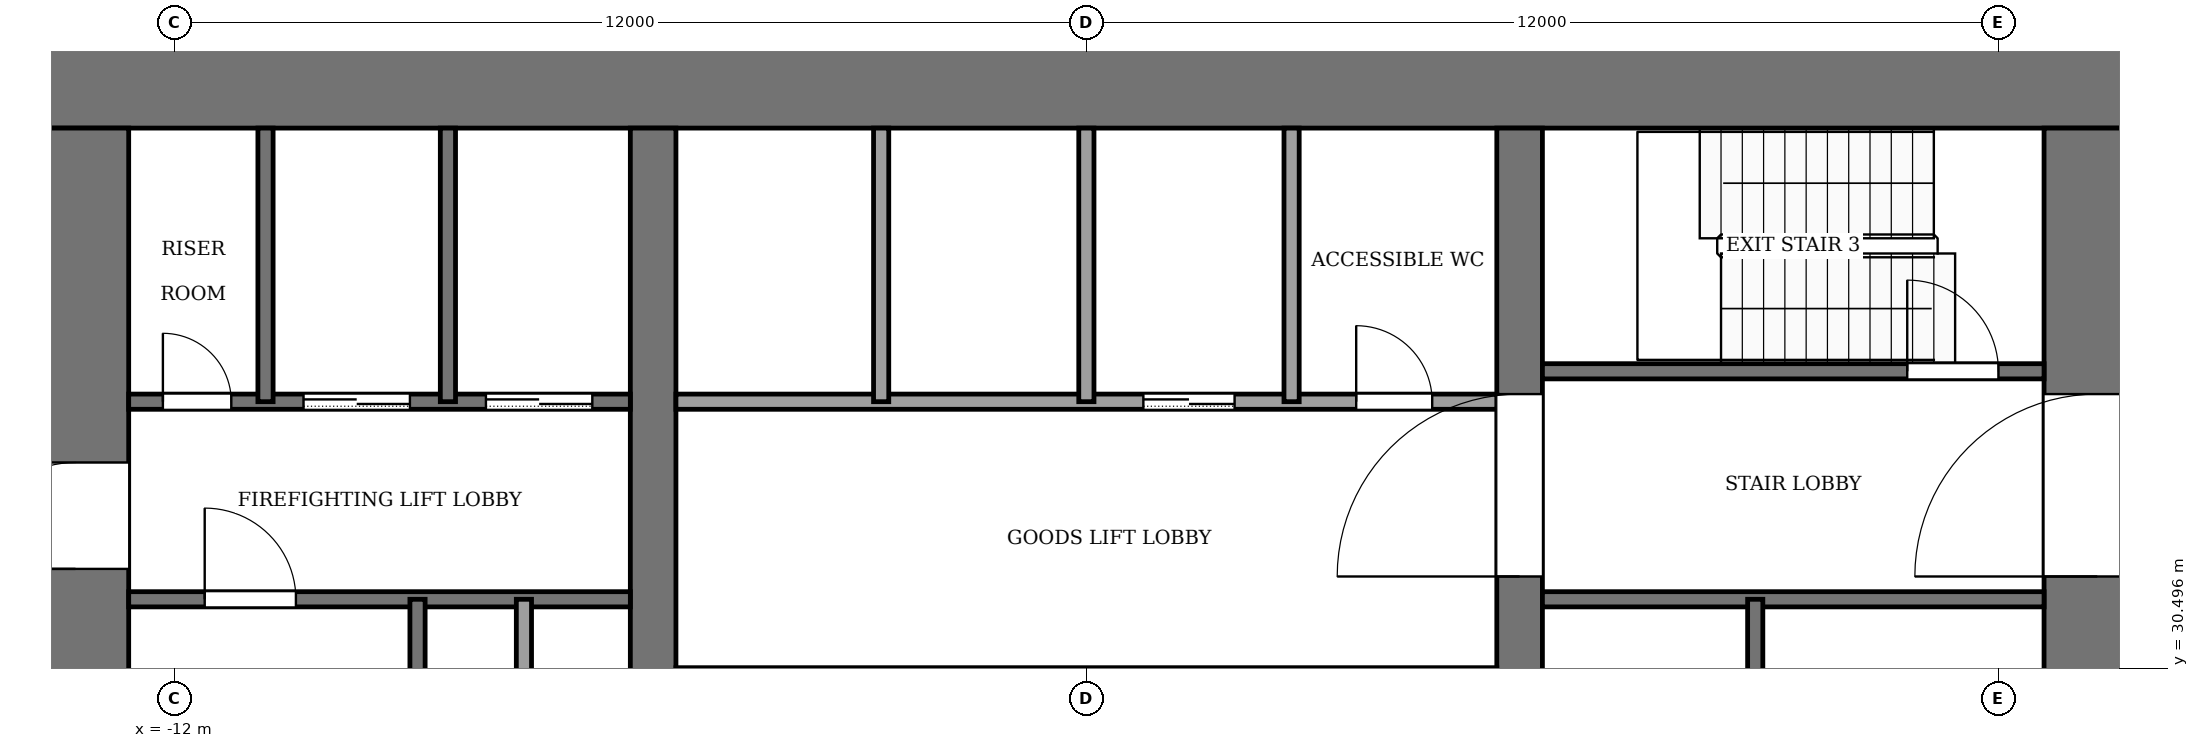
"""IFC4 building model, lengths in metres.
Left out: names, types, materials, properties, quantities, classifications, styles, units other than length and angle.
Written with IfcOpenShell. Run it as: python <this file> out.ifc"""

import sys

from ifc_helpers import new_model, si_unit, direction, frame, frame_2d, origin, place, context, subcontext, project, spatial, rectangle, extrude, element, fill, save


model = new_model("IFC4")
c1 = context("Model", 3, precision=1e-05, world=origin(), true_north=direction((0.0, 1.0)))
c2 = subcontext(c1, "Body", "Model", "MODEL_VIEW")
j1 = project(units=[si_unit("LENGTHUNIT", "METRE"), si_unit("PLANEANGLEUNIT", "RADIAN")], contexts=[c1])
p1 = place(None, origin())
s1 = spatial("IfcSite", under=j1, at=p1, CompositionType="ELEMENT")
p2 = place(p1, origin())
s2 = spatial("IfcBuilding", under=s1, at=p2, CompositionType="ELEMENT")
p3 = place(p2, frame((0.0, 0.0, 22.0)))
s3 = spatial("IfcBuildingStorey", under=s2, at=p3, CompositionType="ELEMENT", Elevation=22.0)
p4 = place(p3, frame((-14.0, 38.3, -0.13), z_axis=(0.0, 0.0, 1.0), x_axis=(1.0, 0.0, 0.0)))
e1 = element("IfcWall", 1, at=p4, inside=s3, PredefinedType="SHEAR", context=c2, shape_type="SweptSolid", body=[
    extrude(rectangle(XDim=28.0, YDim=1.4, at=frame_2d((14.0, 0.0))), origin(), (0.0, 0.0, 1.0), 4.0),
])
p5 = place(p3, frame((-13.3, 18.4, -0.13), z_axis=(0.0, 0.0, 1.0), x_axis=(0.0, 1.0, 0.0)))
e2 = element("IfcWall", 2, at=p5, inside=s3, PredefinedType="SHEAR", context=c2, shape_type="SweptSolid", body=[
    extrude(rectangle(XDim=19.2, YDim=1.4, at=frame_2d((9.6, 0.0))), origin(), (0.0, 0.0, 1.0), 4.0),
])
p6 = place(p5, frame((2.8, 0.0, 0.13)))
e3 = element("IfcOpeningElement", 3, at=p6, cuts=e2, PredefinedType="OPENING", context=c2, shape_type="SweptSolid", body=[
    extrude(rectangle(XDim=2.4, YDim=2.4, at=frame_2d((1.2, 1.2))), frame((0.0, 0.71, 0.0), z_axis=(0.0, -1.0, 0.0), x_axis=(1.0, 0.0, 0.0)), (0.0, 0.0, 1.0), 1.42),
])
p7 = place(p5, frame((13.4, 0.0, 0.13)))
e4 = element("IfcOpeningElement", 4, at=p7, cuts=e2, PredefinedType="OPENING", context=c2, shape_type="SweptSolid", body=[
    extrude(rectangle(XDim=1.4, YDim=2.2, at=frame_2d((0.7, 1.1))), frame((0.0, 0.71, 0.0), z_axis=(0.0, -1.0, 0.0), x_axis=(1.0, 0.0, 0.0)), (0.0, 0.0, 1.0), 1.42),
])
p8 = place(p3, frame((13.3, 18.4, -0.13), z_axis=(0.0, 0.0, 1.0), x_axis=(0.0, 1.0, 0.0)))
e5 = element("IfcWall", 5, at=p8, inside=s3, PredefinedType="SHEAR", context=c2, shape_type="SweptSolid", body=[
    extrude(rectangle(XDim=19.2, YDim=1.4, at=frame_2d((9.6, 0.0))), origin(), (0.0, 0.0, 1.0), 4.0),
])
p9 = place(p8, frame((2.8, 0.0, 0.13)))
e6 = element("IfcOpeningElement", 6, at=p9, cuts=e5, PredefinedType="OPENING", context=c2, shape_type="SweptSolid", body=[
    extrude(rectangle(XDim=2.4, YDim=2.4, at=frame_2d((1.2, 1.2))), frame((0.0, 0.71, 0.0), z_axis=(0.0, -1.0, 0.0), x_axis=(1.0, 0.0, 0.0)), (0.0, 0.0, 1.0), 1.42),
])
p10 = place(p8, frame((13.3, 0.0, 0.13)))
e7 = element("IfcOpeningElement", 7, at=p10, cuts=e5, PredefinedType="OPENING", context=c2, shape_type="SweptSolid", body=[
    extrude(rectangle(XDim=2.4, YDim=2.4, at=frame_2d((1.2, 1.2))), frame((0.0, 0.71, 0.0), z_axis=(0.0, -1.0, 0.0), x_axis=(1.0, 0.0, 0.0)), (0.0, 0.0, 1.0), 1.42),
])
p11 = place(p3, frame((-5.7, 18.4, -0.13), z_axis=(0.0, 0.0, 1.0), x_axis=(0.0, 1.0, 0.0)))
e8 = element("IfcWall", 8, at=p11, inside=s3, PredefinedType="SHEAR", context=c2, shape_type="SweptSolid", body=[
    extrude(rectangle(XDim=19.2, YDim=0.6, at=frame_2d((9.6, 0.0))), origin(), (0.0, 0.0, 1.0), 4.0),
])
p12 = place(p11, frame((8.35, 0.0, 0.13)))
e9 = element("IfcOpeningElement", 9, at=p12, cuts=e8, PredefinedType="OPENING", context=c2, shape_type="SweptSolid", body=[
    extrude(rectangle(XDim=0.9, YDim=2.1, at=frame_2d((0.45, 1.05))), frame((0.0, 0.31, 0.0), z_axis=(0.0, -1.0, 0.0), x_axis=(1.0, 0.0, 0.0)), (0.0, 0.0, 1.0), 0.62),
])
p13 = place(p3, frame((5.7, 18.4, -0.13), z_axis=(0.0, 0.0, 1.0), x_axis=(0.0, 1.0, 0.0)))
e10 = element("IfcWall", 10, at=p13, inside=s3, PredefinedType="SHEAR", context=c2, shape_type="SweptSolid", body=[
    extrude(rectangle(XDim=19.2, YDim=0.6, at=frame_2d((9.6, 0.0))), origin(), (0.0, 0.0, 1.0), 4.0),
])
p14 = place(p13, frame((8.35, 0.0, 0.13)))
e11 = element("IfcOpeningElement", 11, at=p14, cuts=e10, PredefinedType="OPENING", context=c2, shape_type="SweptSolid", body=[
    extrude(rectangle(XDim=0.9, YDim=2.1, at=frame_2d((0.45, 1.05))), frame((0.0, 0.31, 0.0), z_axis=(0.0, -1.0, 0.0), x_axis=(1.0, 0.0, 0.0)), (0.0, 0.0, 1.0), 0.62),
])
p15 = place(p13, frame((13.3, 0.0, 0.13)))
e12 = element("IfcOpeningElement", 12, at=p15, cuts=e10, PredefinedType="OPENING", context=c2, shape_type="SweptSolid", body=[
    extrude(rectangle(XDim=2.4, YDim=2.4, at=frame_2d((1.2, 1.2))), frame((0.0, 0.31, 0.0), z_axis=(0.0, -1.0, 0.0), x_axis=(1.0, 0.0, 0.0)), (0.0, 0.0, 1.0), 0.62),
])
p16 = place(p3, frame((-12.6, 31.4, 0.0), z_axis=(0.0, 0.0, 1.0), x_axis=(1.0, 0.0, 0.0)))
e13 = element("IfcWall", 13, at=p16, inside=s3, PredefinedType="PARTITIONING", context=c2, shape_type="SweptSolid", body=[
    extrude(rectangle(XDim=6.6, YDim=0.2, at=frame_2d((3.3, 0.0))), origin(), (0.0, 0.0, 1.0), 3.87),
])
p17 = place(p16, frame((1.0, 0.0, 0.0)))
e14 = element("IfcOpeningElement", 14, at=p17, cuts=e13, PredefinedType="OPENING", context=c2, shape_type="SweptSolid", body=[
    extrude(rectangle(XDim=1.2, YDim=2.2, at=frame_2d((0.6, 1.1))), frame((0.0, 0.11, 0.0), z_axis=(0.0, -1.0, 0.0), x_axis=(1.0, 0.0, 0.0)), (0.0, 0.0, 1.0), 0.22),
])
p18 = place(p3, frame((6.0, 31.4, 0.0), z_axis=(0.0, 0.0, 1.0), x_axis=(1.0, 0.0, 0.0)))
e15 = element("IfcWall", 15, at=p18, inside=s3, PredefinedType="PARTITIONING", context=c2, shape_type="SweptSolid", body=[
    extrude(rectangle(XDim=6.6, YDim=0.2, at=frame_2d((3.3, 0.0))), origin(), (0.0, 0.0, 1.0), 3.87),
])
p19 = place(p3, frame((-12.6, 34.0, 0.0), z_axis=(0.0, 0.0, 1.0), x_axis=(1.0, 0.0, 0.0)))
e16 = element("IfcWall", 16, at=p19, inside=s3, PredefinedType="PARTITIONING", context=c2, shape_type="SweptSolid", body=[
    extrude(rectangle(XDim=6.6, YDim=0.2, at=frame_2d((3.3, 0.0))), origin(), (0.0, 0.0, 1.0), 3.87),
])
p20 = place(p19, frame((4.7, 0.0, 0.0)))
e17 = element("IfcOpeningElement", 17, at=p20, cuts=e16, PredefinedType="OPENING", context=c2, shape_type="SweptSolid", body=[
    extrude(rectangle(XDim=1.4, YDim=2.2, at=frame_2d((0.7, 1.1))), frame((0.0, 0.11, 0.0), z_axis=(0.0, -1.0, 0.0), x_axis=(1.0, 0.0, 0.0)), (0.0, 0.0, 1.0), 0.22),
])
p21 = place(p19, frame((2.3, 0.0, 0.0)))
e18 = element("IfcOpeningElement", 18, at=p21, cuts=e16, PredefinedType="OPENING", context=c2, shape_type="SweptSolid", body=[
    extrude(rectangle(XDim=1.4, YDim=2.2, at=frame_2d((0.7, 1.1))), frame((0.0, 0.11, 0.0), z_axis=(0.0, -1.0, 0.0), x_axis=(1.0, 0.0, 0.0)), (0.0, 0.0, 1.0), 0.22),
])
p22 = place(p19, frame((0.45, 0.0, 0.0)))
e19 = element("IfcOpeningElement", 19, at=p22, cuts=e16, PredefinedType="OPENING", context=c2, shape_type="SweptSolid", body=[
    extrude(rectangle(XDim=0.9, YDim=2.1, at=frame_2d((0.45, 1.05))), frame((0.0, 0.11, 0.0), z_axis=(0.0, -1.0, 0.0), x_axis=(1.0, 0.0, 0.0)), (0.0, 0.0, 1.0), 0.22),
])
p23 = place(p3, frame((-5.4, 34.0, 0.0), z_axis=(0.0, 0.0, 1.0), x_axis=(1.0, 0.0, 0.0)))
e20 = element("IfcWall", 20, at=p23, inside=s3, PredefinedType="PARTITIONING", context=c2, shape_type="SweptSolid", body=[
    extrude(rectangle(XDim=10.8, YDim=0.2, at=frame_2d((5.4, 0.0))), origin(), (0.0, 0.0, 1.0), 3.87),
])
p24 = place(p23, frame((6.15, 0.0, 0.0)))
e21 = element("IfcOpeningElement", 21, at=p24, cuts=e20, PredefinedType="OPENING", context=c2, shape_type="SweptSolid", body=[
    extrude(rectangle(XDim=1.2, YDim=2.2, at=frame_2d((0.6, 1.1))), frame((0.0, 0.11, 0.0), z_axis=(0.0, -1.0, 0.0), x_axis=(1.0, 0.0, 0.0)), (0.0, 0.0, 1.0), 0.22),
])
p25 = place(p23, frame((8.95, 0.0, 0.0)))
e22 = element("IfcOpeningElement", 22, at=p25, cuts=e20, PredefinedType="OPENING", context=c2, shape_type="SweptSolid", body=[
    extrude(rectangle(XDim=1.0, YDim=2.1, at=frame_2d((0.5, 1.05))), frame((0.0, 0.11, 0.0), z_axis=(0.0, -1.0, 0.0), x_axis=(1.0, 0.0, 0.0)), (0.0, 0.0, 1.0), 0.22),
])
p26 = place(p3, frame((6.0, 34.4, 0.0), z_axis=(0.0, 0.0, 1.0), x_axis=(1.0, 0.0, 0.0)))
e23 = element("IfcWall", 23, at=p26, inside=s3, PredefinedType="PARTITIONING", context=c2, shape_type="SweptSolid", body=[
    extrude(rectangle(XDim=6.6, YDim=0.2, at=frame_2d((3.3, 0.0))), origin(), (0.0, 0.0, 1.0), 3.87),
])
p27 = place(p26, frame((4.8, 0.0, 0.0)))
e24 = element("IfcOpeningElement", 24, at=p27, cuts=e23, PredefinedType="OPENING", context=c2, shape_type="SweptSolid", body=[
    extrude(rectangle(XDim=1.2, YDim=2.2, at=frame_2d((0.6, 1.1))), frame((0.0, 0.11, 0.0), z_axis=(0.0, -1.0, 0.0), x_axis=(1.0, 0.0, 0.0)), (0.0, 0.0, 1.0), 0.22),
])
p28 = place(p3, frame((-10.8, 34.0, 0.0), z_axis=(0.0, 0.0, 1.0), x_axis=(0.0, 1.0, 0.0)))
e25 = element("IfcWall", 25, at=p28, inside=s3, PredefinedType="PARTITIONING", context=c2, shape_type="SweptSolid", body=[
    extrude(rectangle(XDim=3.6, YDim=0.2, at=frame_2d((1.8, 0.0))), origin(), (0.0, 0.0, 1.0), 3.87),
])
p29 = place(p3, frame((-8.8, 24.0, 0.0), z_axis=(0.0, 0.0, 1.0), x_axis=(0.0, 1.0, 0.0)))
e26 = element("IfcWall", 26, at=p29, inside=s3, PredefinedType="PARTITIONING", context=c2, shape_type="SweptSolid", body=[
    extrude(rectangle(XDim=7.4, YDim=0.2, at=frame_2d((3.7, 0.0))), origin(), (0.0, 0.0, 1.0), 3.87),
])
p30 = place(p3, frame((-8.4, 34.0, 0.0), z_axis=(0.0, 0.0, 1.0), x_axis=(0.0, 1.0, 0.0)))
e27 = element("IfcWall", 27, at=p30, inside=s3, PredefinedType="PARTITIONING", context=c2, shape_type="SweptSolid", body=[
    extrude(rectangle(XDim=3.6, YDim=0.2, at=frame_2d((1.8, 0.0))), origin(), (0.0, 0.0, 1.0), 3.87),
])
p31 = place(p3, frame((-7.4, 24.0, 0.0), z_axis=(0.0, 0.0, 1.0), x_axis=(0.0, 1.0, 0.0)))
e28 = element("IfcWall", 28, at=p31, inside=s3, PredefinedType="PARTITIONING", context=c2, shape_type="SweptSolid", body=[
    extrude(rectangle(XDim=7.4, YDim=0.2, at=frame_2d((3.7, 0.0))), origin(), (0.0, 0.0, 1.0), 3.87),
])
for number, where, z_axis, x_axis in (
    (29, (-2.7, 34.0, 0.0), (0.0, 0.0, 1.0), (0.0, 1.0, 0.0)),
    (30, (0.0, 34.0, 0.0), (0.0, 0.0, 1.0), (0.0, 1.0, 0.0)),
    (31, (2.7, 34.0, 0.0), (0.0, 0.0, 1.0), (0.0, 1.0, 0.0)),
):
    element("IfcWall", number, at=place(p3, frame(where, z_axis=z_axis, x_axis=x_axis)), inside=s3, PredefinedType="PARTITIONING", context=c2, shape_type="SweptSolid", body=[
        extrude(rectangle(XDim=3.6, YDim=0.2, at=frame_2d((1.8, 0.0))), origin(), (0.0, 0.0, 1.0), 3.87),
    ])
p32 = place(p3, frame((8.8, 24.0, 0.0), z_axis=(0.0, 0.0, 1.0), x_axis=(0.0, 1.0, 0.0)))
e32 = element("IfcWall", 32, at=p32, inside=s3, PredefinedType="PARTITIONING", context=c2, shape_type="SweptSolid", body=[
    extrude(rectangle(XDim=7.4, YDim=0.2, at=frame_2d((3.7, 0.0))), origin(), (0.0, 0.0, 1.0), 3.87),
])
p33 = place(p24, origin())
e33 = element("IfcDoor", 33, at=p33, inside=s3, OperationType="SLIDING_TO_LEFT", PredefinedType="DOOR", context=c2, shape_type="SweptSolid", body=[
    extrude(rectangle(XDim=1.2, YDim=2.2, at=frame_2d((0.6, 1.1))), frame((0.0, 0.025, 0.0), z_axis=(0.0, -1.0, 0.0), x_axis=(1.0, 0.0, 0.0)), (0.0, 0.0, 1.0), 0.05),
])
fill(e21, e33)
p34 = place(p20, origin())
e34 = element("IfcDoor", 34, at=p34, inside=s3, OperationType="SLIDING_TO_LEFT", PredefinedType="DOOR", context=c2, shape_type="SweptSolid", body=[
    extrude(rectangle(XDim=1.4, YDim=2.2, at=frame_2d((0.7, 1.1))), frame((0.0, 0.025, 0.0), z_axis=(0.0, -1.0, 0.0), x_axis=(1.0, 0.0, 0.0)), (0.0, 0.0, 1.0), 0.05),
])
fill(e17, e34)
p35 = place(p21, origin())
e35 = element("IfcDoor", 35, at=p35, inside=s3, OperationType="SLIDING_TO_LEFT", PredefinedType="DOOR", context=c2, shape_type="SweptSolid", body=[
    extrude(rectangle(XDim=1.4, YDim=2.2, at=frame_2d((0.7, 1.1))), frame((0.0, 0.025, 0.0), z_axis=(0.0, -1.0, 0.0), x_axis=(1.0, 0.0, 0.0)), (0.0, 0.0, 1.0), 0.05),
])
fill(e18, e35)
p36 = place(p22, origin())
e36 = element("IfcDoor", 36, at=p36, inside=s3, OperationType="SINGLE_SWING_RIGHT", PredefinedType="DOOR", context=c2, shape_type="SweptSolid", body=[
    extrude(rectangle(XDim=0.9, YDim=2.1, at=frame_2d((0.45, 1.05))), frame((0.0, 0.025, 0.0), z_axis=(0.0, -1.0, 0.0), x_axis=(1.0, 0.0, 0.0)), (0.0, 0.0, 1.0), 0.05),
])
fill(e19, e36)
p37 = place(p25, origin())
e37 = element("IfcDoor", 37, at=p37, inside=s3, OperationType="SINGLE_SWING_LEFT", PredefinedType="DOOR", context=c2, shape_type="SweptSolid", body=[
    extrude(rectangle(XDim=1.0, YDim=2.1, at=frame_2d((0.5, 1.05))), frame((0.0, 0.025, 0.0), z_axis=(0.0, -1.0, 0.0), x_axis=(1.0, 0.0, 0.0)), (0.0, 0.0, 1.0), 0.05),
])
fill(e22, e37)
p38 = place(p17, origin())
e38 = element("IfcDoor", 38, at=p38, inside=s3, OperationType="SINGLE_SWING_RIGHT", PredefinedType="DOOR", context=c2, shape_type="SweptSolid", body=[
    extrude(rectangle(XDim=1.2, YDim=2.2, at=frame_2d((0.6, 1.1))), frame((0.0, 0.025, 0.0), z_axis=(0.0, -1.0, 0.0), x_axis=(1.0, 0.0, 0.0)), (0.0, 0.0, 1.0), 0.05),
])
fill(e14, e38)
p39 = place(p27, origin())
e39 = element("IfcDoor", 39, at=p39, inside=s3, OperationType="SINGLE_SWING_RIGHT", PredefinedType="DOOR", context=c2, shape_type="SweptSolid", body=[
    extrude(rectangle(XDim=1.2, YDim=2.2, at=frame_2d((0.6, 1.1))), frame((0.0, 0.025, 0.0), z_axis=(0.0, -1.0, 0.0), x_axis=(1.0, 0.0, 0.0)), (0.0, 0.0, 1.0), 0.05),
])
fill(e24, e39)
p40 = place(p15, origin())
e40 = element("IfcDoor", 40, at=p40, inside=s3, OperationType="DOUBLE_DOOR_SINGLE_SWING", PredefinedType="DOOR", context=c2, shape_type="SweptSolid", body=[
    extrude(rectangle(XDim=2.4, YDim=2.4, at=frame_2d((1.2, 1.2))), frame((0.0, 0.025, 0.0), z_axis=(0.0, -1.0, 0.0), x_axis=(1.0, 0.0, 0.0)), (0.0, 0.0, 1.0), 0.05),
])
fill(e12, e40)
p41 = place(p10, origin())
e41 = element("IfcDoor", 41, at=p41, inside=s3, OperationType="DOUBLE_DOOR_SINGLE_SWING", PredefinedType="DOOR", context=c2, shape_type="SweptSolid", body=[
    extrude(rectangle(XDim=2.4, YDim=2.4, at=frame_2d((1.2, 1.2))), frame((0.0, 0.025, 0.0), z_axis=(0.0, -1.0, 0.0), x_axis=(1.0, 0.0, 0.0)), (0.0, 0.0, 1.0), 0.05),
])
fill(e7, e41)
p42 = place(p7, origin())
e42 = element("IfcDoor", 42, at=p42, inside=s3, OperationType="SINGLE_SWING_RIGHT", PredefinedType="DOOR", context=c2, shape_type="SweptSolid", body=[
    extrude(rectangle(XDim=1.4, YDim=2.2, at=frame_2d((0.7, 1.1))), frame((0.0, 0.025, 0.0), z_axis=(0.0, -1.0, 0.0), x_axis=(1.0, 0.0, 0.0)), (0.0, 0.0, 1.0), 0.05),
])
fill(e4, e42)
save(model, sys.argv[1])
